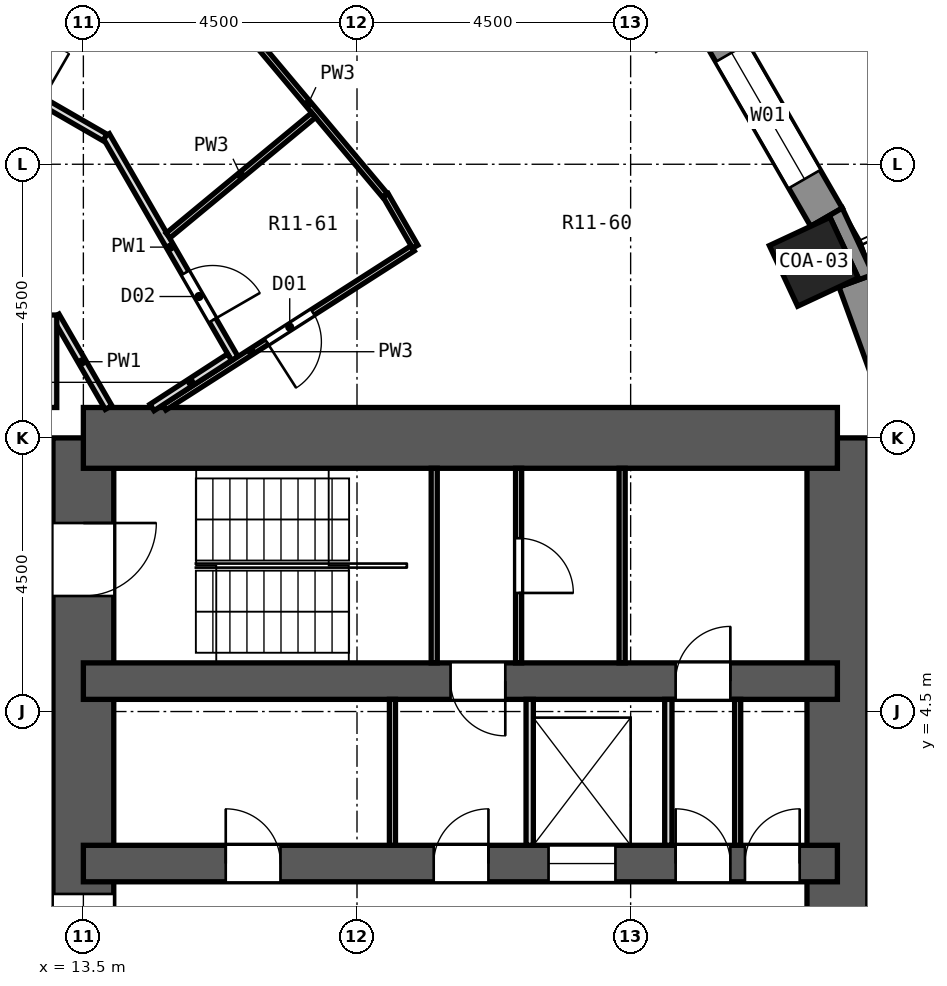
"""IFC4 building model, lengths in metres.
Left out: names, types, materials, properties, quantities, classifications, styles, units other than length and angle.
Written with IfcOpenShell. Run it as: python <this file> out.ifc"""

import sys

from ifc_helpers import new_model, si_unit, direction, frame, frame_2d, origin, origin_2d, place, context, subcontext, project, spatial, polyline, rectangle, outline, extrude, element, fill, save


model = new_model("IFC4")
c1 = context("Model", 3, precision=1e-05, world=origin(), true_north=direction((0.0, 1.0)))
c2 = subcontext(c1, "Body", "Model", "MODEL_VIEW")
j1 = project(units=[si_unit("LENGTHUNIT", "METRE"), si_unit("PLANEANGLEUNIT", "RADIAN")], contexts=[c1])
p1 = place(None, origin())
s1 = spatial("IfcSite", under=j1, at=p1, CompositionType="ELEMENT")
p2 = place(p1, origin())
s2 = spatial("IfcBuilding", under=s1, at=p2, CompositionType="ELEMENT")
p3 = place(p2, frame((0.0, 0.0, 46.1)))
s3 = spatial("IfcBuildingStorey", under=s2, at=p3, CompositionType="ELEMENT", Elevation=46.1)
p4 = place(p3, frame((25.512, 11.897, 0.0), z_axis=(0.0, 0.0, 1.0), x_axis=(0.906307787037, 0.422618261741, 0.0)))
e1 = element("IfcColumn", 1, at=p4, inside=s3, PredefinedType="COLUMN", context=c2, shape_type="SweptSolid", body=[
    extrude(rectangle(XDim=1.1, YDim=1.1, at=origin_2d()), origin(), (0.0, 0.0, 1.0), 3.3),
])
p5 = place(p3, frame((13.5, -9.0, 0.0), z_axis=(0.0, 0.0, 1.0), x_axis=(0.0, 1.0, 0.0)))
e2 = element("IfcWall", 2, at=p5, inside=s3, PredefinedType="SHEAR", context=c2, shape_type="SweptSolid", body=[
    extrude(rectangle(XDim=18.0, YDim=1.0, at=frame_2d((9.0, 0.0))), origin(), (0.0, 0.0, 1.0), 3.3),
])
p6 = place(p5, frame((15.4, 0.0, 0.0)))
e3 = element("IfcOpeningElement", 3, at=p6, cuts=e2, PredefinedType="OPENING", context=c2, shape_type="SweptSolid", body=[
    extrude(rectangle(XDim=1.2, YDim=2.1, at=frame_2d((0.6, 1.05))), frame((0.0, 0.512, 0.0), z_axis=(0.0, -1.0, 0.0), x_axis=(1.0, 0.0, 0.0)), (0.0, 0.0, 1.0), 1.024),
])
p7 = place(p5, frame((1.4, 0.0, 0.0)))
e4 = element("IfcOpeningElement", 4, at=p7, cuts=e2, PredefinedType="OPENING", context=c2, shape_type="SweptSolid", body=[
    extrude(rectangle(XDim=1.2, YDim=2.1, at=frame_2d((0.6, 1.05))), frame((0.0, 0.512, 0.0), z_axis=(0.0, -1.0, 0.0), x_axis=(1.0, 0.0, 0.0)), (0.0, 0.0, 1.0), 1.024),
])
p8 = place(p5, frame((7.5, 0.0, 0.0)))
e5 = element("IfcOpeningElement", 5, at=p8, cuts=e2, PredefinedType="OPENING", context=c2, shape_type="SweptSolid", body=[
    extrude(rectangle(XDim=3.0, YDim=2.4, at=frame_2d((1.5, 1.2))), frame((0.0, 0.512, 0.0), z_axis=(0.0, -1.0, 0.0), x_axis=(1.0, 0.0, 0.0)), (0.0, 0.0, 1.0), 1.024),
])
p9 = place(p3, frame((25.9, -9.0, 0.0), z_axis=(0.0, 0.0, 1.0), x_axis=(0.0, 1.0, 0.0)))
e6 = element("IfcWall", 6, at=p9, inside=s3, PredefinedType="SHEAR", context=c2, shape_type="SweptSolid", body=[
    extrude(rectangle(XDim=18.0, YDim=1.0, at=frame_2d((9.0, 0.0))), origin(), (0.0, 0.0, 1.0), 3.3),
])
p10 = place(p3, frame((13.5, 9.0, 0.0), z_axis=(0.0, 0.0, 1.0), x_axis=(1.0, 0.0, 0.0)))
e7 = element("IfcWall", 7, at=p10, inside=s3, PredefinedType="SHEAR", context=c2, shape_type="SweptSolid", body=[
    extrude(rectangle(XDim=12.4, YDim=1.0, at=frame_2d((6.2, 0.0))), origin(), (0.0, 0.0, 1.0), 3.3),
])
p11 = place(p3, frame((13.5, 5.0, 0.0), z_axis=(0.0, 0.0, 1.0), x_axis=(1.0, 0.0, 0.0)))
e8 = element("IfcWall", 8, at=p11, inside=s3, PredefinedType="SHEAR", context=c2, shape_type="SweptSolid", body=[
    extrude(rectangle(XDim=12.4, YDim=0.6, at=frame_2d((6.2, 0.0))), origin(), (0.0, 0.0, 1.0), 3.3),
])
p12 = place(p11, frame((6.039, 0.0, 0.0)))
e9 = element("IfcOpeningElement", 9, at=p12, cuts=e8, PredefinedType="OPENING", context=c2, shape_type="SweptSolid", body=[
    extrude(rectangle(XDim=0.9, YDim=2.1, at=frame_2d((0.45, 1.05))), frame((0.0, 0.312, 0.0), z_axis=(0.0, -1.0, 0.0), x_axis=(1.0, 0.0, 0.0)), (0.0, 0.0, 1.0), 0.624),
])
p13 = place(p11, frame((9.74, 0.0, 0.0)))
e10 = element("IfcOpeningElement", 10, at=p13, cuts=e8, PredefinedType="OPENING", context=c2, shape_type="SweptSolid", body=[
    extrude(rectangle(XDim=0.9, YDim=2.1, at=frame_2d((0.45, 1.05))), frame((0.0, 0.312, 0.0), z_axis=(0.0, -1.0, 0.0), x_axis=(1.0, 0.0, 0.0)), (0.0, 0.0, 1.0), 0.624),
])
p14 = place(p3, frame((13.5, 2.0, 0.0), z_axis=(0.0, 0.0, 1.0), x_axis=(1.0, 0.0, 0.0)))
e11 = element("IfcWall", 11, at=p14, inside=s3, PredefinedType="SHEAR", context=c2, shape_type="SweptSolid", body=[
    extrude(rectangle(XDim=12.4, YDim=0.6, at=frame_2d((6.2, 0.0))), origin(), (0.0, 0.0, 1.0), 3.3),
])
p15 = place(p14, frame((7.65, 0.0, 0.0)))
e12 = element("IfcOpeningElement", 12, at=p15, cuts=e11, PredefinedType="OPENING", context=c2, shape_type="SweptSolid", body=[
    extrude(rectangle(XDim=1.1, YDim=2.1, at=frame_2d((0.55, 1.05))), frame((0.0, 0.312, 0.0), z_axis=(0.0, -1.0, 0.0), x_axis=(1.0, 0.0, 0.0)), (0.0, 0.0, 1.0), 0.624),
])
p16 = place(p14, frame((2.341, 0.0, 0.0)))
e13 = element("IfcOpeningElement", 13, at=p16, cuts=e11, PredefinedType="OPENING", context=c2, shape_type="SweptSolid", body=[
    extrude(rectangle(XDim=0.9, YDim=2.1, at=frame_2d((0.45, 1.05))), frame((0.0, 0.312, 0.0), z_axis=(0.0, -1.0, 0.0), x_axis=(1.0, 0.0, 0.0)), (0.0, 0.0, 1.0), 0.624),
])
p17 = place(p14, frame((5.761, 0.0, 0.0)))
e14 = element("IfcOpeningElement", 14, at=p17, cuts=e11, PredefinedType="OPENING", context=c2, shape_type="SweptSolid", body=[
    extrude(rectangle(XDim=0.9, YDim=2.1, at=frame_2d((0.45, 1.05))), frame((0.0, 0.312, 0.0), z_axis=(0.0, -1.0, 0.0), x_axis=(1.0, 0.0, 0.0)), (0.0, 0.0, 1.0), 0.624),
])
p18 = place(p14, frame((9.74, 0.0, 0.0)))
e15 = element("IfcOpeningElement", 15, at=p18, cuts=e11, PredefinedType="OPENING", context=c2, shape_type="SweptSolid", body=[
    extrude(rectangle(XDim=0.9, YDim=2.1, at=frame_2d((0.45, 1.05))), frame((0.0, 0.312, 0.0), z_axis=(0.0, -1.0, 0.0), x_axis=(1.0, 0.0, 0.0)), (0.0, 0.0, 1.0), 0.624),
])
p19 = place(p14, frame((10.88, 0.0, 0.0)))
e16 = element("IfcOpeningElement", 16, at=p19, cuts=e11, PredefinedType="OPENING", context=c2, shape_type="SweptSolid", body=[
    extrude(rectangle(XDim=0.9, YDim=2.1, at=frame_2d((0.45, 1.05))), frame((0.0, 0.312, 0.0), z_axis=(0.0, -1.0, 0.0), x_axis=(1.0, 0.0, 0.0)), (0.0, 0.0, 1.0), 0.624),
])
p20 = place(p3, frame((27.523, 7.971, 0.0), z_axis=(0.0, 0.0, 1.0), x_axis=(-0.342028474173, 0.939689588564, 0.0)))
e17 = element("IfcWall", 17, at=p20, inside=s3, PredefinedType="SOLIDWALL", context=c2, shape_type="SweptSolid", body=[
    extrude(rectangle(XDim=3.846, YDim=0.6, at=frame_2d((1.923, 0.0))), origin(), (0.0, 0.0, 1.0), 2.75),
])
p21 = place(p3, frame((25.721, 12.63, 0.0), z_axis=(0.0, 0.0, 1.0), x_axis=(-0.499989888488, 0.86603124159, 0.0)))
e18 = element("IfcWall", 18, at=p21, inside=s3, PredefinedType="SOLIDWALL", context=c2, shape_type="SweptSolid", body=[
    extrude(rectangle(XDim=3.846, YDim=0.6, at=frame_2d((1.923, 0.0))), origin(), (0.0, 0.0, 1.0), 2.75),
])
p22 = place(p21, frame((0.723, 0.0, 0.9)))
e19 = element("IfcOpeningElement", 19, at=p22, cuts=e18, PredefinedType="OPENING", context=c2, shape_type="SweptSolid", body=[
    extrude(rectangle(XDim=2.4, YDim=1.8, at=frame_2d((1.2, 0.9))), frame((0.0, 0.312, 0.0), z_axis=(0.0, -1.0, 0.0), x_axis=(1.0, 0.0, 0.0)), (0.0, 0.0, 1.0), 0.624),
])
p23 = place(p3, origin())
e20 = element("IfcWall", 20, at=p23, inside=s3, PredefinedType="SOLIDWALL", context=c2, shape_type="SweptSolid", body=[
    extrude(outline(polyline([(25.981, 12.78), (25.461, 12.479), (25.779, 12.628), (26.243, 11.631), (25.926, 11.483), (26.49, 11.688), (25.981, 12.78)])), origin(), (0.0, 0.0, 1.0), 2.75),
])
p24 = place(p3, frame((18.468, 12.993, 0.0), z_axis=(0.0, 0.0, 1.0), x_axis=(0.499060839642, -0.866566949713, 0.0)))
e21 = element("IfcWall", 21, at=p24, inside=s3, PredefinedType="PARTITIONING", context=c2, shape_type="SweptSolid", body=[
    extrude(rectangle(XDim=0.98, YDim=0.1, at=frame_2d((0.49, 0.0))), origin(), (0.0, 0.0, 1.0), 2.75),
])
p25 = place(p3, frame((13.045, 11.005, 0.0), z_axis=(0.0, 0.0, 1.0), x_axis=(0.500066958712, -0.865986741702, 0.0)))
e22 = element("IfcWall", 22, at=p25, inside=s3, PredefinedType="PARTITIONING", context=c2, shape_type="SweptSolid", body=[
    extrude(rectangle(XDim=1.738, YDim=0.125, at=frame_2d((0.869, 0.0))), origin(), (0.0, 0.0, 1.0), 2.75),
])
p26 = place(p3, frame((13.873, 13.971, 0.0), z_axis=(0.0, 0.0, 1.0), x_axis=(0.500056722401, -0.865992652614, 0.0)))
e23 = element("IfcWall", 23, at=p26, inside=s3, PredefinedType="PARTITIONING", context=c2, shape_type="SweptSolid", body=[
    extrude(rectangle(XDim=4.236, YDim=0.125, at=frame_2d((2.118, 0.0))), origin(), (0.0, 0.0, 1.0), 2.75),
])
p27 = place(p26, frame((2.606, 0.0, 0.0)))
e24 = element("IfcOpeningElement", 24, at=p27, cuts=e23, PredefinedType="OPENING", context=c2, shape_type="SweptSolid", body=[
    extrude(rectangle(XDim=0.9, YDim=2.1, at=frame_2d((0.45, 1.05))), frame((0.0, 0.074, 0.0), z_axis=(0.0, -1.0, 0.0), x_axis=(1.0, 0.0, 0.0)), (0.0, 0.0, 1.0), 0.149),
])
p28 = place(p3, frame((15.93, 16.002, 0.0), z_axis=(0.0, 0.0, 1.0), x_axis=(0.642925836876, -0.76592843548, 0.0)))
e25 = element("IfcWall", 25, at=p28, inside=s3, PredefinedType="PARTITIONING", context=c2, shape_type="SweptSolid", body=[
    extrude(rectangle(XDim=3.936, YDim=0.1, at=frame_2d((1.968, 0.0))), origin(), (0.0, 0.0, 1.0), 2.75),
])
p29 = place(p3, frame((5.029, 19.036, 0.0), z_axis=(0.0, 0.0, 1.0), x_axis=(0.866024825845, -0.50000100102, 0.0)))
e26 = element("IfcWall", 26, at=p29, inside=s3, PredefinedType="PARTITIONING", context=c2, shape_type="SweptSolid", body=[
    extrude(rectangle(XDim=10.192, YDim=0.125, at=frame_2d((5.096, 0.0))), origin(), (0.0, 0.0, 1.0), 2.75),
])
p30 = place(p29, frame((8.09, 0.0, 0.0)))
e27 = element("IfcOpeningElement", 27, at=p30, cuts=e26, PredefinedType="OPENING", context=c2, shape_type="SweptSolid", body=[
    extrude(rectangle(XDim=0.9, YDim=2.1, at=frame_2d((0.45, 1.05))), frame((0.0, 0.074, 0.0), z_axis=(0.0, -1.0, 0.0), x_axis=(1.0, 0.0, 0.0)), (0.0, 0.0, 1.0), 0.149),
])
p31 = place(p3, frame((14.83, 9.5, 0.0), z_axis=(0.0, 0.0, 1.0), x_axis=(0.842016302485, 0.539452079752, 0.0)))
e28 = element("IfcWall", 28, at=p31, inside=s3, PredefinedType="PARTITIONING", context=c2, shape_type="SweptSolid", body=[
    extrude(rectangle(XDim=4.851, YDim=0.1, at=frame_2d((2.426, 0.0))), origin(), (0.0, 0.0, 1.0), 2.75),
])
p32 = place(p31, frame((2.001, 0.0, 0.0)))
e29 = element("IfcOpeningElement", 29, at=p32, cuts=e28, PredefinedType="OPENING", context=c2, shape_type="SweptSolid", body=[
    extrude(rectangle(XDim=0.9, YDim=2.1, at=frame_2d((0.45, 1.05))), frame((0.0, 0.062, 0.0), z_axis=(0.0, -1.0, 0.0), x_axis=(1.0, 0.0, 0.0)), (0.0, 0.0, 1.0), 0.124),
])
p33 = place(p3, frame((14.629, 9.5, 0.0), z_axis=(0.0, 0.0, 1.0), x_axis=(0.83882853689, 0.544395706908, 0.0)))
e30 = element("IfcWall", 30, at=p33, inside=s3, PredefinedType="PARTITIONING", context=c2, shape_type="SweptSolid", body=[
    extrude(rectangle(XDim=1.521, YDim=0.125, at=frame_2d((0.76, 0.0))), origin(), (0.0, 0.0, 1.0), 2.75),
])
p34 = place(p3, frame((14.893, 12.328, 0.0), z_axis=(0.0, 0.0, 1.0), x_axis=(0.770464868695, 0.63748245945, 0.0)))
e31 = element("IfcWall", 31, at=p34, inside=s3, PredefinedType="PARTITIONING", context=c2, shape_type="SweptSolid", body=[
    extrude(rectangle(XDim=3.106, YDim=0.1, at=frame_2d((1.553, 0.0))), origin(), (0.0, 0.0, 1.0), 2.75),
])
p35 = place(p3, frame((13.0, 9.5, 0.0), z_axis=(0.0, 0.0, 1.0), x_axis=(0.0, 1.0, 0.0)))
e32 = element("IfcWall", 32, at=p35, inside=s3, PredefinedType="PARTITIONING", context=c2, shape_type="SweptSolid", body=[
    extrude(rectangle(XDim=1.521, YDim=0.125, at=frame_2d((0.76, 0.0))), origin(), (0.0, 0.0, 1.0), 2.75),
])
p36 = place(p3, frame((18.583, 2.3, 0.0), z_axis=(0.0, 0.0, 1.0), x_axis=(0.0, 1.0, 0.0)))
e33 = element("IfcWall", 33, at=p36, inside=s3, PredefinedType="PARTITIONING", context=c2, shape_type="SweptSolid", body=[
    extrude(rectangle(XDim=2.4, YDim=0.1, at=frame_2d((1.2, 0.0))), origin(), (0.0, 0.0, 1.0), 2.75),
])
for number, where, z_axis, x_axis in (
    (34, (20.84, 2.3, 0.0), (0.0, 0.0, 1.0), (0.0, 1.0, 0.0)),
    (35, (23.12, 2.3, 0.0), (0.0, 0.0, 1.0), (0.0, 1.0, 0.0)),
):
    element("IfcWall", number, at=place(p3, frame(where, z_axis=z_axis, x_axis=x_axis)), inside=s3, PredefinedType="PARTITIONING", context=c2, shape_type="SweptSolid", body=[
        extrude(rectangle(XDim=2.4, YDim=0.12, at=frame_2d((1.2, 0.0))), origin(), (0.0, 0.0, 1.0), 2.75),
    ])
p37 = place(p3, frame((24.26, 2.3, 0.0), z_axis=(0.0, 0.0, 1.0), x_axis=(0.0, 1.0, 0.0)))
e36 = element("IfcWall", 36, at=p37, inside=s3, PredefinedType="PARTITIONING", context=c2, shape_type="SweptSolid", body=[
    extrude(rectangle(XDim=2.4, YDim=0.1, at=frame_2d((1.2, 0.0))), origin(), (0.0, 0.0, 1.0), 2.75),
])
p38 = place(p3, frame((19.27, 5.3, 0.0), z_axis=(0.0, 0.0, 1.0), x_axis=(0.0, 1.0, 0.0)))
e37 = element("IfcWall", 37, at=p38, inside=s3, PredefinedType="PARTITIONING", context=c2, shape_type="SweptSolid", body=[
    extrude(rectangle(XDim=3.2, YDim=0.1, at=frame_2d((1.6, 0.0))), origin(), (0.0, 0.0, 1.0), 2.75),
])
p39 = place(p3, frame((20.658, 5.3, 0.0), z_axis=(0.0, 0.0, 1.0), x_axis=(0.0, 1.0, 0.0)))
e38 = element("IfcWall", 38, at=p39, inside=s3, PredefinedType="PARTITIONING", context=c2, shape_type="SweptSolid", body=[
    extrude(rectangle(XDim=3.2, YDim=0.1, at=frame_2d((1.6, 0.0))), origin(), (0.0, 0.0, 1.0), 2.75),
])
p40 = place(p39, frame((1.15, 0.0, 0.0)))
e39 = element("IfcOpeningElement", 39, at=p40, cuts=e38, PredefinedType="OPENING", context=c2, shape_type="SweptSolid", body=[
    extrude(rectangle(XDim=0.9, YDim=2.1, at=frame_2d((0.45, 1.05))), frame((0.0, 0.062, 0.0), z_axis=(0.0, -1.0, 0.0), x_axis=(1.0, 0.0, 0.0)), (0.0, 0.0, 1.0), 0.124),
])
p41 = place(p3, frame((22.36, 5.3, 0.0), z_axis=(0.0, 0.0, 1.0), x_axis=(0.0, 1.0, 0.0)))
e40 = element("IfcWall", 40, at=p41, inside=s3, PredefinedType="PARTITIONING", context=c2, shape_type="SweptSolid", body=[
    extrude(rectangle(XDim=3.2, YDim=0.1, at=frame_2d((1.6, 0.0))), origin(), (0.0, 0.0, 1.0), 2.75),
])
p42 = place(p22, origin())
e41 = element("IfcWindow", 41, at=p42, inside=s3, PartitioningType="SINGLE_PANEL", PredefinedType="WINDOW", context=c2, shape_type="SweptSolid", body=[
    extrude(rectangle(XDim=2.4, YDim=1.8, at=frame_2d((1.2, 0.9))), frame((0.0, 0.18, 0.0), z_axis=(0.0, -1.0, 0.0), x_axis=(1.0, 0.0, 0.0)), (0.0, 0.0, 1.0), 0.06),
])
fill(e19, e41)
p43 = place(p32, frame((0.9, 0.0, 0.0), z_axis=(0.0, 0.0, 1.0), x_axis=(-1.0, 0.0, 0.0)))
e42 = element("IfcDoor", 42, at=p43, inside=s3, OperationType="SINGLE_SWING_RIGHT", PredefinedType="DOOR", context=c2, shape_type="SweptSolid", body=[
    extrude(rectangle(XDim=0.9, YDim=2.1, at=frame_2d((0.45, 1.05))), frame((0.0, 0.025, 0.0), z_axis=(0.0, -1.0, 0.0), x_axis=(1.0, 0.0, 0.0)), (0.0, 0.0, 1.0), 0.05),
])
fill(e29, e42)
p44 = place(p27, origin())
e43 = element("IfcDoor", 43, at=p44, inside=s3, OperationType="SINGLE_SWING_RIGHT", PredefinedType="DOOR", context=c2, shape_type="SweptSolid", body=[
    extrude(rectangle(XDim=0.9, YDim=2.1, at=frame_2d((0.45, 1.05))), frame((0.0, 0.025, 0.0), z_axis=(0.0, -1.0, 0.0), x_axis=(1.0, 0.0, 0.0)), (0.0, 0.0, 1.0), 0.05),
])
fill(e24, e43)
p45 = place(p15, origin())
e44 = element("IfcDoor", 44, at=p45, inside=s3, OperationType="DOUBLE_DOOR_SLIDING", PredefinedType="DOOR", context=c2, shape_type="SweptSolid", body=[
    extrude(rectangle(XDim=1.1, YDim=2.1, at=frame_2d((0.55, 1.05))), frame((0.0, 0.025, 0.0), z_axis=(0.0, -1.0, 0.0), x_axis=(1.0, 0.0, 0.0)), (0.0, 0.0, 1.0), 0.05),
])
fill(e12, e44)
p46 = place(p16, origin())
e45 = element("IfcDoor", 45, at=p46, inside=s3, OperationType="SINGLE_SWING_LEFT", PredefinedType="DOOR", context=c2, shape_type="SweptSolid", body=[
    extrude(rectangle(XDim=0.9, YDim=2.1, at=frame_2d((0.45, 1.05))), frame((0.0, 0.025, 0.0), z_axis=(0.0, -1.0, 0.0), x_axis=(1.0, 0.0, 0.0)), (0.0, 0.0, 1.0), 0.05),
])
fill(e13, e45)
p47 = place(p17, origin())
e46 = element("IfcDoor", 46, at=p47, inside=s3, OperationType="SINGLE_SWING_RIGHT", PredefinedType="DOOR", context=c2, shape_type="SweptSolid", body=[
    extrude(rectangle(XDim=0.9, YDim=2.1, at=frame_2d((0.45, 1.05))), frame((0.0, 0.025, 0.0), z_axis=(0.0, -1.0, 0.0), x_axis=(1.0, 0.0, 0.0)), (0.0, 0.0, 1.0), 0.05),
])
fill(e14, e46)
p48 = place(p18, origin())
e47 = element("IfcDoor", 47, at=p48, inside=s3, OperationType="SINGLE_SWING_LEFT", PredefinedType="DOOR", context=c2, shape_type="SweptSolid", body=[
    extrude(rectangle(XDim=0.9, YDim=2.1, at=frame_2d((0.45, 1.05))), frame((0.0, 0.025, 0.0), z_axis=(0.0, -1.0, 0.0), x_axis=(1.0, 0.0, 0.0)), (0.0, 0.0, 1.0), 0.05),
])
fill(e15, e47)
p49 = place(p19, origin())
e48 = element("IfcDoor", 48, at=p49, inside=s3, OperationType="SINGLE_SWING_RIGHT", PredefinedType="DOOR", context=c2, shape_type="SweptSolid", body=[
    extrude(rectangle(XDim=0.9, YDim=2.1, at=frame_2d((0.45, 1.05))), frame((0.0, 0.025, 0.0), z_axis=(0.0, -1.0, 0.0), x_axis=(1.0, 0.0, 0.0)), (0.0, 0.0, 1.0), 0.05),
])
fill(e16, e48)
p50 = place(p40, frame((0.9, 0.0, 0.0), z_axis=(0.0, 0.0, 1.0), x_axis=(-1.0, 0.0, 0.0)))
e49 = element("IfcDoor", 49, at=p50, inside=s3, OperationType="SINGLE_SWING_RIGHT", PredefinedType="DOOR", context=c2, shape_type="SweptSolid", body=[
    extrude(rectangle(XDim=0.9, YDim=2.1, at=frame_2d((0.45, 1.05))), frame((0.0, 0.025, 0.0), z_axis=(0.0, -1.0, 0.0), x_axis=(1.0, 0.0, 0.0)), (0.0, 0.0, 1.0), 0.05),
])
fill(e39, e49)
p51 = place(p12, frame((0.9, 0.0, 0.0), z_axis=(0.0, 0.0, 1.0), x_axis=(-1.0, 0.0, 0.0)))
e50 = element("IfcDoor", 50, at=p51, inside=s3, OperationType="SINGLE_SWING_LEFT", PredefinedType="DOOR", context=c2, shape_type="SweptSolid", body=[
    extrude(rectangle(XDim=0.9, YDim=2.1, at=frame_2d((0.45, 1.05))), frame((0.0, 0.025, 0.0), z_axis=(0.0, -1.0, 0.0), x_axis=(1.0, 0.0, 0.0)), (0.0, 0.0, 1.0), 0.05),
])
fill(e9, e50)
p52 = place(p13, origin())
e51 = element("IfcDoor", 51, at=p52, inside=s3, OperationType="SINGLE_SWING_RIGHT", PredefinedType="DOOR", context=c2, shape_type="SweptSolid", body=[
    extrude(rectangle(XDim=0.9, YDim=2.1, at=frame_2d((0.45, 1.05))), frame((0.0, 0.025, 0.0), z_axis=(0.0, -1.0, 0.0), x_axis=(1.0, 0.0, 0.0)), (0.0, 0.0, 1.0), 0.05),
])
fill(e10, e51)
p53 = place(p6, frame((1.2, 0.0, 0.0), z_axis=(0.0, 0.0, 1.0), x_axis=(-1.0, 0.0, 0.0)))
e52 = element("IfcDoor", 52, at=p53, inside=s3, OperationType="SINGLE_SWING_LEFT", PredefinedType="DOOR", context=c2, shape_type="SweptSolid", body=[
    extrude(rectangle(XDim=1.2, YDim=2.1, at=frame_2d((0.6, 1.05))), frame((0.0, 0.025, 0.0), z_axis=(0.0, -1.0, 0.0), x_axis=(1.0, 0.0, 0.0)), (0.0, 0.0, 1.0), 0.05),
])
fill(e3, e52)
p54 = place(p8, origin())
e53 = element("IfcDoor", 53, at=p54, inside=s3, OperationType="DOUBLE_DOOR_SLIDING", PredefinedType="DOOR", context=c2, shape_type="SweptSolid", body=[
    extrude(rectangle(XDim=3.0, YDim=2.4, at=frame_2d((1.5, 1.2))), frame((0.0, 0.025, 0.0), z_axis=(0.0, -1.0, 0.0), x_axis=(1.0, 0.0, 0.0)), (0.0, 0.0, 1.0), 0.05),
])
fill(e5, e53)
save(model, sys.argv[1])
